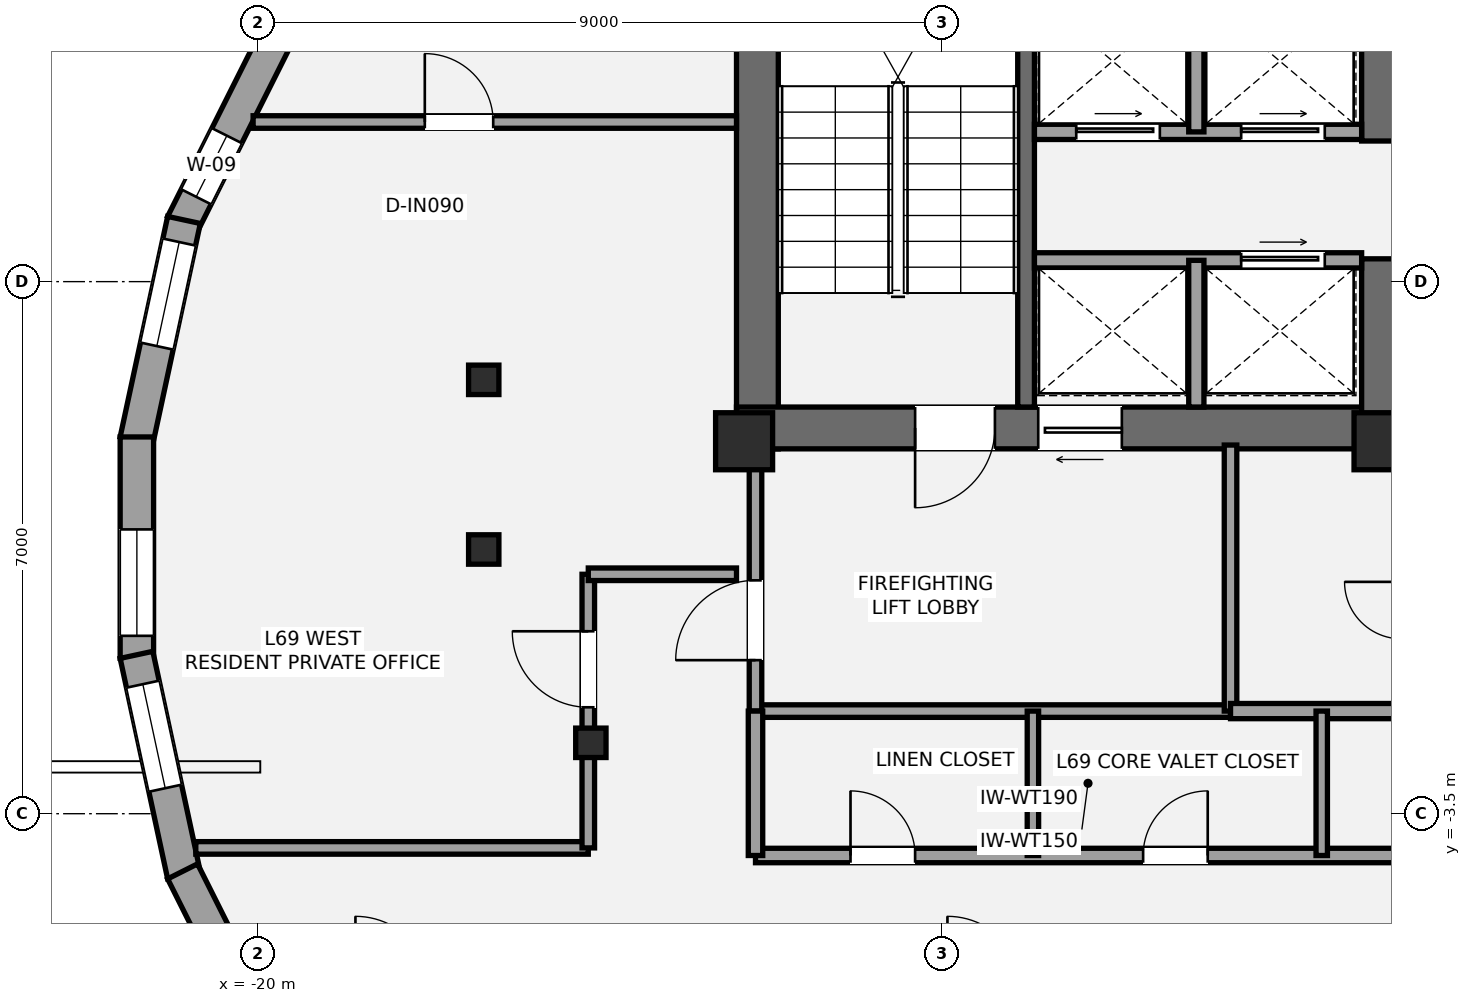
"""IFC4 building model, lengths in metres.
Left out: names, types, materials, properties, quantities, classifications, styles, units other than length and angle.
Written with IfcOpenShell. Run it as: python <this file> out.ifc"""

import sys

from ifc_helpers import new_model, si_unit, direction, frame, frame_2d, origin, origin_2d, place, context, subcontext, project, spatial, rectangle, i_section, extrude, element, fill, save


model = new_model("IFC4")
c1 = context("Model", 3, precision=1e-05, world=origin(), true_north=direction((0.0, 1.0)))
c2 = subcontext(c1, "Body", "Model", "MODEL_VIEW")
j1 = project(units=[si_unit("LENGTHUNIT", "METRE"), si_unit("PLANEANGLEUNIT", "RADIAN")], contexts=[c1])
p1 = place(None, origin())
s1 = spatial("IfcSite", under=j1, at=p1, CompositionType="ELEMENT")
p2 = place(p1, origin())
s2 = spatial("IfcBuilding", under=s1, at=p2, CompositionType="ELEMENT")
p3 = place(p2, frame((0.0, 0.0, 244.65)))
s3 = spatial("IfcBuildingStorey", under=s2, at=p3, CompositionType="ELEMENT", Elevation=244.65)
p4 = place(p3, frame((-13.425, 1.3, 0.0), z_axis=(0.0, 0.0, 1.0), x_axis=(0.0, 1.0, 0.0)))
e1 = element("IfcWall", 1, at=p4, inside=s3, PredefinedType="SHEAR", context=c2, shape_type="SweptSolid", body=[
    extrude(rectangle(XDim=8.25, YDim=0.55, at=frame_2d((4.125, 0.0))), origin(), (0.0, 0.0, 1.0), 3.15),
])
p5 = place(p3, frame((-4.925, 1.575, 0.0), z_axis=(0.0, 0.0, 1.0), x_axis=(-1.0, 0.0, 0.0)))
e2 = element("IfcWall", 2, at=p5, inside=s3, PredefinedType="SHEAR", context=c2, shape_type="SweptSolid", body=[
    extrude(rectangle(XDim=8.775, YDim=0.55, at=frame_2d((4.387, 0.0))), origin(), (0.0, 0.0, 1.0), 3.15),
])
p6 = place(p5, frame((5.375, 0.0, 0.0)))
e3 = element("IfcOpeningElement", 3, at=p6, cuts=e2, PredefinedType="OPENING", context=c2, shape_type="SweptSolid", body=[
    extrude(rectangle(XDim=1.05, YDim=2.15, at=frame_2d((0.525, 1.075))), frame((0.0, 0.285, 0.0), z_axis=(0.0, -1.0, 0.0), x_axis=(1.0, 0.0, 0.0)), (0.0, 0.0, 1.0), 0.57),
])
p7 = place(p5, frame((3.705, 0.0, 0.0)))
e4 = element("IfcOpeningElement", 4, at=p7, cuts=e2, PredefinedType="OPENING", context=c2, shape_type="SweptSolid", body=[
    extrude(rectangle(XDim=1.1, YDim=2.2, at=frame_2d((0.55, 1.1))), frame((0.0, 0.285, 0.0), z_axis=(0.0, -1.0, 0.0), x_axis=(1.0, 0.0, 0.0)), (0.0, 0.0, 1.0), 0.57),
])
p8 = place(p3, frame((-5.2, 1.3, 0.0), z_axis=(0.0, 0.0, 1.0), x_axis=(0.0, 1.0, 0.0)))
e5 = element("IfcWall", 5, at=p8, inside=s3, PredefinedType="SHEAR", context=c2, shape_type="SweptSolid", body=[
    extrude(rectangle(XDim=2.5, YDim=0.55, at=frame_2d((1.25, 0.0))), origin(), (0.0, 0.0, 1.0), 3.15),
])
p9 = place(p3, frame((-5.2, 5.35, 0.0), z_axis=(0.0, 0.0, 1.0), x_axis=(0.0, 1.0, 0.0)))
e6 = element("IfcWall", 6, at=p9, inside=s3, PredefinedType="SHEAR", context=c2, shape_type="SweptSolid", body=[
    extrude(rectangle(XDim=2.0, YDim=0.55, at=frame_2d((1.0, 0.0))), origin(), (0.0, 0.0, 1.0), 3.15),
])
p10 = place(p3, frame((-9.89, 1.85, 0.0), z_axis=(0.0, 0.0, 1.0), x_axis=(0.0, 1.0, 0.0)))
e7 = element("IfcWall", 7, at=p10, inside=s3, PredefinedType="SHEAR", context=c2, shape_type="SweptSolid", body=[
    extrude(rectangle(XDim=7.15, YDim=0.22, at=frame_2d((3.575, 0.0))), origin(), (0.0, 0.0, 1.0), 3.15),
])
for number, where, z_axis, x_axis in (
    (8, (-13.6, 1.4, 0.0), (0.0, 0.0, 1.0), (1.0, 0.0, 0.0)),
    (9, (-5.2, 1.4, 0.0), (0.0, 0.0, 1.0), (1.0, 0.0, 0.0)),
):
    element("IfcColumn", number, at=place(p3, frame(where, z_axis=z_axis, x_axis=x_axis)), inside=s3, PredefinedType="PILASTER", context=c2, shape_type="SweptSolid", body=[
        extrude(rectangle(XDim=0.75, YDim=0.75, at=origin_2d()), origin(), (0.0, 0.0, 1.0), 3.15),
    ])
for number, where, z_axis, x_axis in (
    (10, (-17.026, 2.208, 0.0), (0.0, 0.0, 1.0), (1.0, 0.0, 0.0)),
    (11, (-17.026, -0.024, 0.0), (0.0, 0.0, 1.0), (1.0, 0.0, 0.0)),
    (12, (-15.616, -2.567, 0.0), (0.0, 0.0, 1.0), (1.0, 0.0, 0.0)),
):
    element("IfcColumn", number, at=place(p3, frame(where, z_axis=z_axis, x_axis=x_axis)), inside=s3, PredefinedType="COLUMN", context=c2, shape_type="SweptSolid", body=[
        extrude(i_section(OverallWidth=0.399, OverallDepth=0.387, WebThickness=0.021, FlangeThickness=0.033, at=origin_2d()), origin(), (0.0, 0.0, 1.0), 3.15),
    ])
p11 = place(p3, frame((-20.988, 4.259, 0.0), z_axis=(0.0, 0.0, 1.0), x_axis=(0.448424724145, 0.893820601002, 0.0)))
e13 = element("IfcWall", 13, at=p11, inside=s3, PredefinedType="STANDARD", context=c2, shape_type="SweptSolid", body=[
    extrude(rectangle(XDim=3.144, YDim=0.44, at=frame_2d((1.572, 0.0))), origin(), (0.0, 0.0, 1.0), 2.336),
])
p12 = place(p11, frame((0.399, 0.0, 0.58)))
e14 = element("IfcOpeningElement", 14, at=p12, cuts=e13, PredefinedType="OPENING", context=c2, shape_type="SweptSolid", body=[
    extrude(rectangle(XDim=0.9, YDim=1.35, at=frame_2d((0.45, 0.675))), frame((0.0, 0.23, 0.0), z_axis=(0.0, -1.0, 0.0), x_axis=(1.0, 0.0, 0.0)), (0.0, 0.0, 1.0), 0.46),
])
p13 = place(p3, frame((-21.594, 1.41, 0.0), z_axis=(0.0, 0.0, 1.0), x_axis=(0.210540350534, 0.977585168053, 0.0)))
e15 = element("IfcWall", 15, at=p13, inside=s3, PredefinedType="STANDARD", context=c2, shape_type="SweptSolid", body=[
    extrude(rectangle(XDim=2.967, YDim=0.44, at=frame_2d((1.484, 0.0))), origin(), (0.0, 0.0, 1.0), 2.336),
])
p14 = place(p13, frame((1.27, 0.0, 0.58)))
e16 = element("IfcOpeningElement", 16, at=p14, cuts=e15, PredefinedType="OPENING", context=c2, shape_type="SweptSolid", body=[
    extrude(rectangle(XDim=1.4, YDim=1.55, at=frame_2d((0.7, 0.775))), frame((0.0, 0.23, 0.0), z_axis=(0.0, -1.0, 0.0), x_axis=(1.0, 0.0, 0.0)), (0.0, 0.0, 1.0), 0.46),
])
p15 = place(p3, frame((-21.589, -1.457, 0.0), z_axis=(0.0, 0.0, 1.0), x_axis=(0.0, 1.0, 0.0)))
e17 = element("IfcWall", 17, at=p15, inside=s3, PredefinedType="STANDARD", context=c2, shape_type="SweptSolid", body=[
    extrude(rectangle(XDim=2.913, YDim=0.44, at=frame_2d((1.457, 0.0))), origin(), (0.0, 0.0, 1.0), 2.34),
])
p16 = place(p15, frame((0.297, 0.0, 0.55)))
e18 = element("IfcOpeningElement", 18, at=p16, cuts=e17, PredefinedType="OPENING", context=c2, shape_type="SweptSolid", body=[
    extrude(rectangle(XDim=1.4, YDim=1.55, at=frame_2d((0.7, 0.775))), frame((0.0, 0.23, 0.0), z_axis=(0.0, -1.0, 0.0), x_axis=(1.0, 0.0, 0.0)), (0.0, 0.0, 1.0), 0.46),
])
p17 = place(p3, frame((-20.969, -4.311, 0.0), z_axis=(0.0, 0.0, 1.0), x_axis=(-0.210540350534, 0.977585168053, 0.0)))
e19 = element("IfcWall", 19, at=p17, inside=s3, PredefinedType="STANDARD", context=c2, shape_type="SweptSolid", body=[
    extrude(rectangle(XDim=2.967, YDim=0.44, at=frame_2d((1.484, 0.0))), origin(), (0.0, 0.0, 1.0), 2.336),
])
p18 = place(p17, frame((1.173, 0.0, 0.58)))
e20 = element("IfcOpeningElement", 20, at=p18, cuts=e19, PredefinedType="OPENING", context=c2, shape_type="SweptSolid", body=[
    extrude(rectangle(XDim=1.4, YDim=1.55, at=frame_2d((0.7, 0.775))), frame((0.0, 0.23, 0.0), z_axis=(0.0, -1.0, 0.0), x_axis=(1.0, 0.0, 0.0)), (0.0, 0.0, 1.0), 0.46),
])
p19 = place(p3, frame((-19.578, -7.069, 0.0), z_axis=(0.0, 0.0, 1.0), x_axis=(-0.448424724145, 0.893820601002, 0.0)))
e21 = element("IfcWall", 21, at=p19, inside=s3, PredefinedType="STANDARD", context=c2, shape_type="SweptSolid", body=[
    extrude(rectangle(XDim=3.144, YDim=0.44, at=frame_2d((1.572, 0.0))), origin(), (0.0, 0.0, 1.0), 2.336),
])
p20 = place(p19, frame((0.25, 0.0, 0.58)))
e22 = element("IfcOpeningElement", 22, at=p20, cuts=e21, PredefinedType="OPENING", context=c2, shape_type="SweptSolid", body=[
    extrude(rectangle(XDim=0.9, YDim=1.35, at=frame_2d((0.45, 0.675))), frame((0.0, 0.23, 0.0), z_axis=(0.0, -1.0, 0.0), x_axis=(1.0, 0.0, 0.0)), (0.0, 0.0, 1.0), 0.46),
])
p21 = place(p3, frame((-13.45, -2.15, 0.0), z_axis=(0.0, 0.0, 1.0), x_axis=(1.0, 0.0, 0.0)))
e23 = element("IfcWall", 23, at=p21, inside=s3, PredefinedType="PARTITIONING", context=c2, shape_type="SweptSolid", body=[
    extrude(rectangle(XDim=6.25, YDim=0.165, at=frame_2d((3.125, 0.0))), origin(), (0.0, 0.0, 1.0), 2.423),
])
p22 = place(p3, frame((-13.45, -2.15, 0.0), z_axis=(0.0, 0.0, 1.0), x_axis=(0.0, 1.0, 0.0)))
e24 = element("IfcWall", 24, at=p22, inside=s3, PredefinedType="PARTITIONING", context=c2, shape_type="SweptSolid", body=[
    extrude(rectangle(XDim=3.5, YDim=0.165, at=frame_2d((1.75, 0.0))), origin(), (0.0, 0.0, 1.0), 2.423),
])
p23 = place(p22, frame((0.67, 0.0, 0.0)))
e25 = element("IfcOpeningElement", 25, at=p23, cuts=e24, PredefinedType="OPENING", context=c2, shape_type="SweptSolid", body=[
    extrude(rectangle(XDim=1.05, YDim=2.15, at=frame_2d((0.525, 1.075))), frame((0.0, 0.093, 0.0), z_axis=(0.0, -1.0, 0.0), x_axis=(1.0, 0.0, 0.0)), (0.0, 0.0, 1.0), 0.185),
])
p24 = place(p3, frame((-7.2, -2.15, 0.0), z_axis=(0.0, 0.0, 1.0), x_axis=(0.0, 1.0, 0.0)))
e26 = element("IfcWall", 26, at=p24, inside=s3, PredefinedType="PARTITIONING", context=c2, shape_type="SweptSolid", body=[
    extrude(rectangle(XDim=3.5, YDim=0.165, at=frame_2d((1.75, 0.0))), origin(), (0.0, 0.0, 1.0), 2.423),
])
p25 = place(p3, frame((-7.2, -2.15, 0.0), z_axis=(0.0, 0.0, 1.0), x_axis=(1.0, 0.0, 0.0)))
e27 = element("IfcWall", 27, at=p25, inside=s3, PredefinedType="SOLIDWALL", context=c2, shape_type="SweptSolid", body=[
    extrude(rectangle(XDim=2.25, YDim=0.2, at=frame_2d((1.125, 0.0))), origin(), (0.0, 0.0, 1.0), 2.97),
])
p26 = place(p3, frame((-9.78, 3.78, 0.0), z_axis=(0.0, 0.0, 1.0), x_axis=(1.0, 0.0, 0.0)))
e28 = element("IfcWall", 28, at=p26, inside=s3, PredefinedType="SOLIDWALL", context=c2, shape_type="SweptSolid", body=[
    extrude(rectangle(XDim=4.305, YDim=0.2, at=frame_2d((2.152, 0.0))), origin(), (0.0, 0.0, 1.0), 2.97),
])
p27 = place(p26, frame((2.72, 0.0, 0.0)))
e29 = element("IfcOpeningElement", 29, at=p27, cuts=e28, PredefinedType="OPENING", context=c2, shape_type="SweptSolid", body=[
    extrude(rectangle(XDim=1.1, YDim=2.2, at=frame_2d((0.55, 1.1))), frame((0.0, 0.11, 0.0), z_axis=(0.0, -1.0, 0.0), x_axis=(1.0, 0.0, 0.0)), (0.0, 0.0, 1.0), 0.22),
])
p28 = place(p3, frame((-7.65, 1.85, 0.0), z_axis=(0.0, 0.0, 1.0), x_axis=(0.0, 1.0, 0.0)))
e30 = element("IfcWall", 30, at=p28, inside=s3, PredefinedType="SOLIDWALL", context=c2, shape_type="SweptSolid", body=[
    extrude(rectangle(XDim=1.93, YDim=0.2, at=frame_2d((0.965, 0.0))), origin(), (0.0, 0.0, 1.0), 2.97),
])
p29 = place(p3, frame((-9.78, 5.47, 0.0), z_axis=(0.0, 0.0, 1.0), x_axis=(1.0, 0.0, 0.0)))
e31 = element("IfcWall", 31, at=p29, inside=s3, PredefinedType="SOLIDWALL", context=c2, shape_type="SweptSolid", body=[
    extrude(rectangle(XDim=4.305, YDim=0.2, at=frame_2d((2.152, 0.0))), origin(), (0.0, 0.0, 1.0), 2.97),
])
p30 = place(p29, frame((0.55, 0.0, 0.0)))
e32 = element("IfcOpeningElement", 32, at=p30, cuts=e31, PredefinedType="OPENING", context=c2, shape_type="SweptSolid", body=[
    extrude(rectangle(XDim=1.1, YDim=2.2, at=frame_2d((0.55, 1.1))), frame((0.0, 0.11, 0.0), z_axis=(0.0, -1.0, 0.0), x_axis=(1.0, 0.0, 0.0)), (0.0, 0.0, 1.0), 0.22),
])
p31 = place(p29, frame((2.72, 0.0, 0.0)))
e33 = element("IfcOpeningElement", 33, at=p31, cuts=e31, PredefinedType="OPENING", context=c2, shape_type="SweptSolid", body=[
    extrude(rectangle(XDim=1.1, YDim=2.2, at=frame_2d((0.55, 1.1))), frame((0.0, 0.11, 0.0), z_axis=(0.0, -1.0, 0.0), x_axis=(1.0, 0.0, 0.0)), (0.0, 0.0, 1.0), 0.22),
])
p32 = place(p3, frame((-7.65, 5.47, 0.0), z_axis=(0.0, 0.0, 1.0), x_axis=(0.0, 1.0, 0.0)))
e34 = element("IfcWall", 34, at=p32, inside=s3, PredefinedType="SOLIDWALL", context=c2, shape_type="SweptSolid", body=[
    extrude(rectangle(XDim=1.86, YDim=0.2, at=frame_2d((0.93, 0.0))), origin(), (0.0, 0.0, 1.0), 2.97),
])
p33 = place(p3, frame((-13.45, -4.05, 0.0), z_axis=(0.0, 0.0, 1.0), x_axis=(1.0, 0.0, 0.0)))
e35 = element("IfcWall", 35, at=p33, inside=s3, PredefinedType="PLUMBINGWALL", context=c2, shape_type="SweptSolid", body=[
    extrude(rectangle(XDim=11.35, YDim=0.19, at=frame_2d((5.675, 0.0))), origin(), (0.0, 0.0, 1.0), 2.357),
])
p34 = place(p33, frame((1.25, 0.0, 0.0)))
e36 = element("IfcOpeningElement", 36, at=p34, cuts=e35, PredefinedType="OPENING", context=c2, shape_type="SweptSolid", body=[
    extrude(rectangle(XDim=0.85, YDim=2.1, at=frame_2d((0.425, 1.05))), frame((0.0, 0.105, 0.0), z_axis=(0.0, -1.0, 0.0), x_axis=(1.0, 0.0, 0.0)), (0.0, 0.0, 1.0), 0.21),
])
p35 = place(p33, frame((5.1, 0.0, 0.0)))
e37 = element("IfcOpeningElement", 37, at=p35, cuts=e35, PredefinedType="OPENING", context=c2, shape_type="SweptSolid", body=[
    extrude(rectangle(XDim=0.85, YDim=2.1, at=frame_2d((0.425, 1.05))), frame((0.0, 0.105, 0.0), z_axis=(0.0, -1.0, 0.0), x_axis=(1.0, 0.0, 0.0)), (0.0, 0.0, 1.0), 0.21),
])
p36 = place(p33, frame((8.95, 0.0, 0.0)))
e38 = element("IfcOpeningElement", 38, at=p36, cuts=e35, PredefinedType="OPENING", context=c2, shape_type="SweptSolid", body=[
    extrude(rectangle(XDim=0.95, YDim=2.15, at=frame_2d((0.475, 1.075))), frame((0.0, 0.105, 0.0), z_axis=(0.0, -1.0, 0.0), x_axis=(1.0, 0.0, 0.0)), (0.0, 0.0, 1.0), 0.21),
])
p37 = place(p3, frame((-13.45, -4.05, 0.0), z_axis=(0.0, 0.0, 1.0), x_axis=(0.0, 1.0, 0.0)))
e39 = element("IfcWall", 39, at=p37, inside=s3, PredefinedType="PLUMBINGWALL", context=c2, shape_type="SweptSolid", body=[
    extrude(rectangle(XDim=1.9, YDim=0.19, at=frame_2d((0.95, 0.0))), origin(), (0.0, 0.0, 1.0), 2.423),
])
p38 = place(p3, frame((-9.8, -4.05, 0.0), z_axis=(0.0, 0.0, 1.0), x_axis=(0.0, 1.0, 0.0)))
e40 = element("IfcWall", 40, at=p38, inside=s3, PredefinedType="PLUMBINGWALL", context=c2, shape_type="SweptSolid", body=[
    extrude(rectangle(XDim=1.9, YDim=0.15, at=frame_2d((0.95, 0.0))), origin(), (0.0, 0.0, 1.0), 2.97),
])
p39 = place(p3, frame((-6.0, -4.05, 0.0), z_axis=(0.0, 0.0, 1.0), x_axis=(0.0, 1.0, 0.0)))
e41 = element("IfcWall", 41, at=p39, inside=s3, PredefinedType="PLUMBINGWALL", context=c2, shape_type="SweptSolid", body=[
    extrude(rectangle(XDim=1.9, YDim=0.15, at=frame_2d((0.95, 0.0))), origin(), (0.0, 0.0, 1.0), 2.431),
])
p40 = place(p3, frame((-20.814, -3.95, 0.0), z_axis=(0.0, 0.0, 1.0), x_axis=(1.0, 0.0, 0.0)))
e42 = element("IfcWall", 42, at=p40, inside=s3, PredefinedType="PARTITIONING", context=c2, shape_type="SweptSolid", body=[
    extrude(rectangle(XDim=5.164, YDim=0.165, at=frame_2d((2.582, 0.0))), origin(), (0.0, 0.0, 1.0), 2.423),
])
p41 = place(p3, frame((-15.65, -3.95, 0.0), z_axis=(0.0, 0.0, 1.0), x_axis=(0.0, 1.0, 0.0)))
e43 = element("IfcWall", 43, at=p41, inside=s3, PredefinedType="PARTITIONING", context=c2, shape_type="SweptSolid", body=[
    extrude(rectangle(XDim=3.6, YDim=0.165, at=frame_2d((1.8, 0.0))), origin(), (0.0, 0.0, 1.0), 2.357),
])
p42 = place(p41, frame((1.85, 0.0, 0.0)))
e44 = element("IfcOpeningElement", 44, at=p42, cuts=e43, PredefinedType="OPENING", context=c2, shape_type="SweptSolid", body=[
    extrude(rectangle(XDim=1.0, YDim=2.15, at=frame_2d((0.5, 1.075))), frame((0.0, 0.093, 0.0), z_axis=(0.0, -1.0, 0.0), x_axis=(1.0, 0.0, 0.0)), (0.0, 0.0, 1.0), 0.185),
])
p43 = place(p3, frame((-15.65, -0.35, 0.0), z_axis=(0.0, 0.0, 1.0), x_axis=(1.0, 0.0, 0.0)))
e45 = element("IfcWall", 45, at=p43, inside=s3, PredefinedType="PARTITIONING", context=c2, shape_type="SweptSolid", body=[
    extrude(rectangle(XDim=1.95, YDim=0.165, at=frame_2d((0.975, 0.0))), origin(), (0.0, 0.0, 1.0), 2.423),
])
p44 = place(p3, frame((-20.06, 5.6, 0.0), z_axis=(0.0, 0.0, 1.0), x_axis=(1.0, 0.0, 0.0)))
e46 = element("IfcWall", 46, at=p44, inside=s3, PredefinedType="PARTITIONING", context=c2, shape_type="SweptSolid", body=[
    extrude(rectangle(XDim=6.36, YDim=0.165, at=frame_2d((3.18, 0.0))), origin(), (0.0, 0.0, 1.0), 2.423),
])
p45 = place(p44, frame((2.259, 0.0, 0.0)))
e47 = element("IfcOpeningElement", 47, at=p45, cuts=e46, PredefinedType="OPENING", context=c2, shape_type="SweptSolid", body=[
    extrude(rectangle(XDim=0.9, YDim=2.1, at=frame_2d((0.45, 1.05))), frame((0.0, 0.093, 0.0), z_axis=(0.0, -1.0, 0.0), x_axis=(1.0, 0.0, 0.0)), (0.0, 0.0, 1.0), 0.185),
])
p46 = place(p12, origin())
e48 = element("IfcWindow", 48, at=p46, inside=s3, PartitioningType="SINGLE_PANEL", PredefinedType="WINDOW", context=c2, shape_type="SweptSolid", body=[
    extrude(rectangle(XDim=0.9, YDim=1.35, at=frame_2d((0.45, 0.675))), frame((0.0, -0.01, 0.0), z_axis=(0.0, -1.0, 0.0), x_axis=(1.0, 0.0, 0.0)), (0.0, 0.0, 1.0), 0.06),
])
fill(e14, e48)
p47 = place(p14, origin())
e49 = element("IfcWindow", 49, at=p47, inside=s3, PartitioningType="SINGLE_PANEL", PredefinedType="WINDOW", context=c2, shape_type="SweptSolid", body=[
    extrude(rectangle(XDim=1.4, YDim=1.55, at=frame_2d((0.7, 0.775))), frame((0.0, -0.01, 0.0), z_axis=(0.0, -1.0, 0.0), x_axis=(1.0, 0.0, 0.0)), (0.0, 0.0, 1.0), 0.06),
])
fill(e16, e49)
p48 = place(p16, origin())
e50 = element("IfcWindow", 50, at=p48, inside=s3, PartitioningType="SINGLE_PANEL", PredefinedType="WINDOW", context=c2, shape_type="SweptSolid", body=[
    extrude(rectangle(XDim=1.4, YDim=1.55, at=frame_2d((0.7, 0.775))), frame((0.0, -0.01, 0.0), z_axis=(0.0, -1.0, 0.0), x_axis=(1.0, 0.0, 0.0)), (0.0, 0.0, 1.0), 0.06),
])
fill(e18, e50)
p49 = place(p18, origin())
e51 = element("IfcWindow", 51, at=p49, inside=s3, PartitioningType="SINGLE_PANEL", PredefinedType="WINDOW", context=c2, shape_type="SweptSolid", body=[
    extrude(rectangle(XDim=1.4, YDim=1.55, at=frame_2d((0.7, 0.775))), frame((0.0, -0.01, 0.0), z_axis=(0.0, -1.0, 0.0), x_axis=(1.0, 0.0, 0.0)), (0.0, 0.0, 1.0), 0.06),
])
fill(e20, e51)
p50 = place(p6, origin())
e52 = element("IfcDoor", 52, at=p50, inside=s3, OperationType="SINGLE_SWING_RIGHT", PredefinedType="DOOR", context=c2, shape_type="SweptSolid", body=[
    extrude(rectangle(XDim=1.05, YDim=2.15, at=frame_2d((0.525, 1.075))), frame((0.0, 0.025, 0.0), z_axis=(0.0, -1.0, 0.0), x_axis=(1.0, 0.0, 0.0)), (0.0, 0.0, 1.0), 0.05),
])
fill(e3, e52)
p51 = place(p23, origin())
e53 = element("IfcDoor", 53, at=p51, inside=s3, OperationType="SINGLE_SWING_LEFT", PredefinedType="DOOR", context=c2, shape_type="SweptSolid", body=[
    extrude(rectangle(XDim=1.05, YDim=2.15, at=frame_2d((0.525, 1.075))), frame((0.0, 0.025, 0.0), z_axis=(0.0, -1.0, 0.0), x_axis=(1.0, 0.0, 0.0)), (0.0, 0.0, 1.0), 0.05),
])
fill(e25, e53)
p52 = place(p7, origin())
e54 = element("IfcDoor", 54, at=p52, inside=s3, OperationType="SLIDING_TO_LEFT", PredefinedType="DOOR", context=c2, shape_type="SweptSolid", body=[
    extrude(rectangle(XDim=1.1, YDim=2.2, at=frame_2d((0.55, 1.1))), frame((0.0, 0.025, 0.0), z_axis=(0.0, -1.0, 0.0), x_axis=(1.0, 0.0, 0.0)), (0.0, 0.0, 1.0), 0.05),
])
fill(e4, e54)
p53 = place(p30, origin())
e55 = element("IfcDoor", 55, at=p53, inside=s3, OperationType="SLIDING_TO_LEFT", PredefinedType="DOOR", context=c2, shape_type="SweptSolid", body=[
    extrude(rectangle(XDim=1.1, YDim=2.2, at=frame_2d((0.55, 1.1))), frame((0.0, 0.025, 0.0), z_axis=(0.0, -1.0, 0.0), x_axis=(1.0, 0.0, 0.0)), (0.0, 0.0, 1.0), 0.05),
])
fill(e32, e55)
p54 = place(p31, origin())
e56 = element("IfcDoor", 56, at=p54, inside=s3, OperationType="SLIDING_TO_LEFT", PredefinedType="DOOR", context=c2, shape_type="SweptSolid", body=[
    extrude(rectangle(XDim=1.1, YDim=2.2, at=frame_2d((0.55, 1.1))), frame((0.0, 0.025, 0.0), z_axis=(0.0, -1.0, 0.0), x_axis=(1.0, 0.0, 0.0)), (0.0, 0.0, 1.0), 0.05),
])
fill(e33, e56)
p55 = place(p27, origin())
e57 = element("IfcDoor", 57, at=p55, inside=s3, OperationType="SLIDING_TO_LEFT", PredefinedType="DOOR", context=c2, shape_type="SweptSolid", body=[
    extrude(rectangle(XDim=1.1, YDim=2.2, at=frame_2d((0.55, 1.1))), frame((0.0, 0.025, 0.0), z_axis=(0.0, -1.0, 0.0), x_axis=(1.0, 0.0, 0.0)), (0.0, 0.0, 1.0), 0.05),
])
fill(e29, e57)
p56 = place(p34, origin())
e58 = element("IfcDoor", 58, at=p56, inside=s3, OperationType="SINGLE_SWING_LEFT", PredefinedType="DOOR", context=c2, shape_type="SweptSolid", body=[
    extrude(rectangle(XDim=0.85, YDim=2.1, at=frame_2d((0.425, 1.05))), frame((0.0, 0.025, 0.0), z_axis=(0.0, -1.0, 0.0), x_axis=(1.0, 0.0, 0.0)), (0.0, 0.0, 1.0), 0.05),
])
fill(e36, e58)
p57 = place(p35, origin())
e59 = element("IfcDoor", 59, at=p57, inside=s3, OperationType="SINGLE_SWING_RIGHT", PredefinedType="DOOR", context=c2, shape_type="SweptSolid", body=[
    extrude(rectangle(XDim=0.85, YDim=2.1, at=frame_2d((0.425, 1.05))), frame((0.0, 0.025, 0.0), z_axis=(0.0, -1.0, 0.0), x_axis=(1.0, 0.0, 0.0)), (0.0, 0.0, 1.0), 0.05),
])
fill(e37, e59)
p58 = place(p42, origin())
e60 = element("IfcDoor", 60, at=p58, inside=s3, OperationType="SINGLE_SWING_RIGHT", PredefinedType="DOOR", context=c2, shape_type="SweptSolid", body=[
    extrude(rectangle(XDim=1.0, YDim=2.15, at=frame_2d((0.5, 1.075))), frame((0.0, 0.025, 0.0), z_axis=(0.0, -1.0, 0.0), x_axis=(1.0, 0.0, 0.0)), (0.0, 0.0, 1.0), 0.05),
])
fill(e44, e60)
p59 = place(p45, origin())
e61 = element("IfcDoor", 61, at=p59, inside=s3, OperationType="SINGLE_SWING_LEFT", PredefinedType="DOOR", context=c2, shape_type="SweptSolid", body=[
    extrude(rectangle(XDim=0.9, YDim=2.1, at=frame_2d((0.45, 1.05))), frame((0.0, 0.025, 0.0), z_axis=(0.0, -1.0, 0.0), x_axis=(1.0, 0.0, 0.0)), (0.0, 0.0, 1.0), 0.05),
])
fill(e47, e61)
save(model, sys.argv[1])
